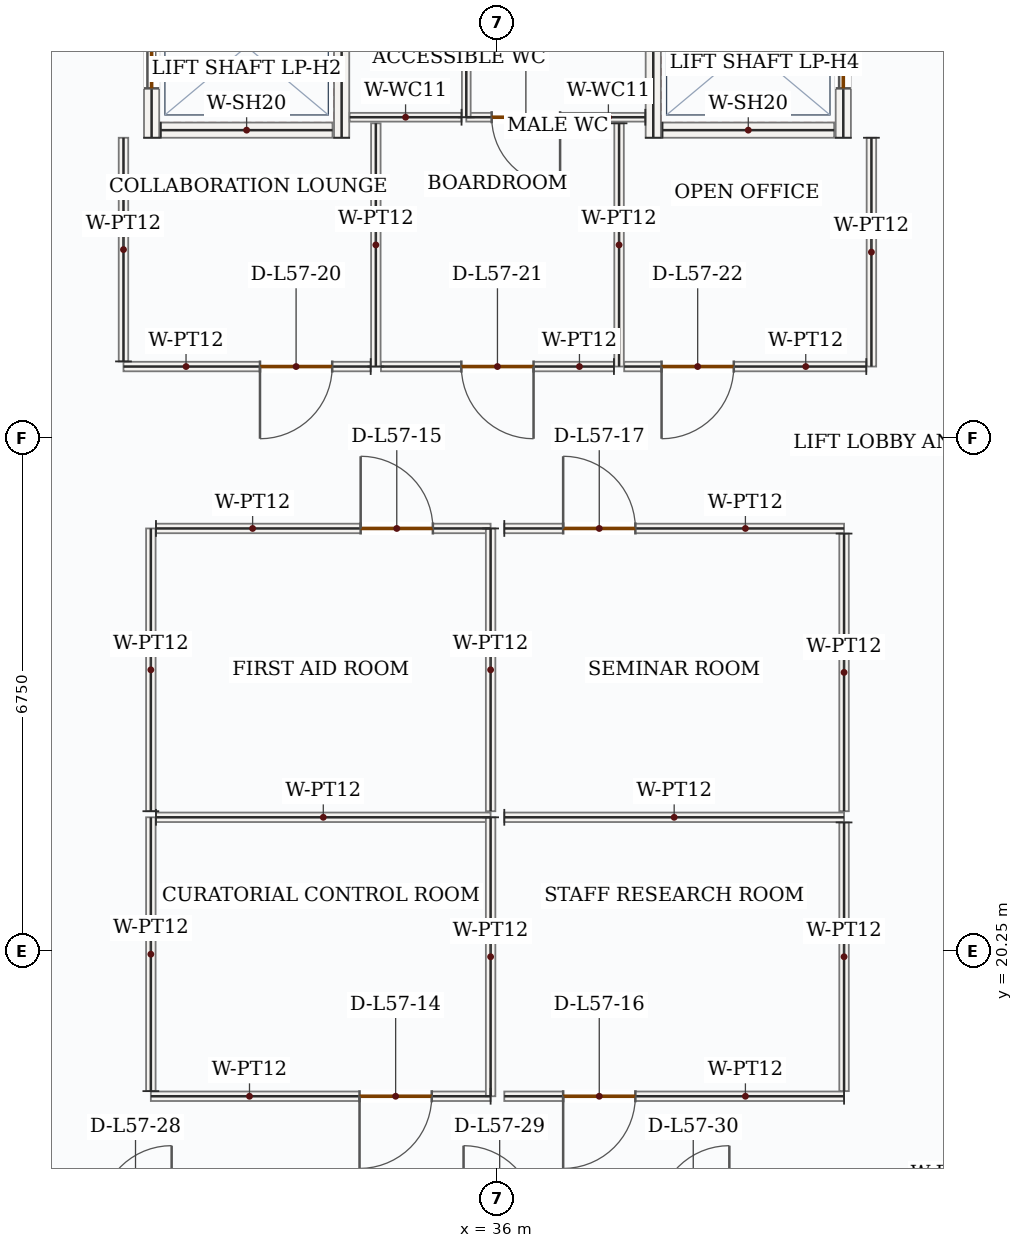
"""IFC4 building model, lengths in metres.
Left out: names, types, materials, properties, quantities, classifications, styles, units other than length and angle.
Written with IfcOpenShell. Run it as: python <this file> out.ifc"""

import sys

from ifc_helpers import new_model, si_unit, direction, frame, frame_2d, origin, place, context, subcontext, project, spatial, rectangle, extrude, source, transform, mapped, element, fill, save


model = new_model("IFC4")
c1 = context("Model", 3, precision=1e-05, world=origin(), true_north=direction((0.0, 1.0)))
c2 = subcontext(c1, "Body", "Model", "MODEL_VIEW")
j1 = project(units=[si_unit("LENGTHUNIT", "METRE"), si_unit("PLANEANGLEUNIT", "RADIAN")], contexts=[c1])
p1 = place(None, origin())
s1 = spatial("IfcSite", under=j1, at=p1, CompositionType="ELEMENT")
p2 = place(p1, origin())
s2 = spatial("IfcBuilding", under=s1, at=p2, CompositionType="ELEMENT")
p3 = place(p2, frame((0.0, 0.0, 242.85)))
s3 = spatial("IfcBuildingStorey", under=s2, at=p3, CompositionType="ELEMENT", Elevation=242.85)
p4 = place(p3, frame((31.45, 30.95, 0.0), z_axis=(0.0, 0.0, 1.0), x_axis=(0.0, 1.0, 0.0)))
e1 = element("IfcWall", 1, at=p4, inside=s3, PredefinedType="SOLIDWALL", context=c2, shape_type="SweptSolid", body=[
    extrude(rectangle(XDim=2.4, YDim=0.2, at=frame_2d((1.2, 0.0))), origin(), (0.0, 0.0, 1.0), 3.5),
])
p5 = place(p4, frame((0.65, 0.0, 0.0)))
e2 = element("IfcOpeningElement", 2, at=p5, cuts=e1, PredefinedType="OPENING", context=c2, shape_type="SweptSolid", body=[
    extrude(rectangle(XDim=1.1, YDim=2.15, at=frame_2d((0.55, 1.075))), frame((0.0, 0.11, 0.0), z_axis=(0.0, -1.0, 0.0), x_axis=(1.0, 0.0, 0.0)), (0.0, 0.0, 1.0), 0.22),
])
m1 = source(origin(), c2, "Body", "SweptSolid", [
    extrude(rectangle(XDim=2.4, YDim=0.2, at=frame_2d((1.2, 0.0))), origin(), (0.0, 0.0, 1.0), 3.5),
])
p6 = place(p3, frame((33.95, 30.95, 0.0), z_axis=(0.0, 0.0, 1.0), x_axis=(0.0, 1.0, 0.0)))
e3 = element("IfcWall", 3, at=p6, inside=s3, PredefinedType="SOLIDWALL", context=c2, shape_type="MappedRepresentation", body=[
    mapped(m1, transform((0.0, 0.0, 0.0), x_axis=(1.0, 0.0, 0.0), y_axis=(0.0, 1.0, 0.0), z_axis=(0.0, 0.0, 1.0), scale=1.0)),
])
m2 = source(origin(), c2, "Body", "SweptSolid", [
    extrude(rectangle(XDim=2.26, YDim=0.2, at=frame_2d((1.13, 0.0))), origin(), (0.0, 0.0, 1.0), 3.5),
])
p7 = place(p3, frame((31.57, 31.05, 0.0), z_axis=(0.0, 0.0, 1.0), x_axis=(1.0, 0.0, 0.0)))
e4 = element("IfcWall", 4, at=p7, inside=s3, PredefinedType="SOLIDWALL", context=c2, shape_type="MappedRepresentation", body=[
    mapped(m2, transform((0.0, 0.0, 0.0), x_axis=(1.0, 0.0, 0.0), y_axis=(0.0, 1.0, 0.0), z_axis=(0.0, 0.0, 1.0), scale=1.0)),
])
p8 = place(p3, frame((38.05, 30.95, 0.0), z_axis=(0.0, 0.0, 1.0), x_axis=(0.0, 1.0, 0.0)))
e5 = element("IfcWall", 5, at=p8, inside=s3, PredefinedType="SOLIDWALL", context=c2, shape_type="MappedRepresentation", body=[
    mapped(m1, transform((0.0, 0.0, 0.0), x_axis=(1.0, 0.0, 0.0), y_axis=(0.0, 1.0, 0.0), z_axis=(0.0, 0.0, 1.0), scale=1.0)),
])
p9 = place(p3, frame((40.55, 30.95, 0.0), z_axis=(0.0, 0.0, 1.0), x_axis=(0.0, 1.0, 0.0)))
e6 = element("IfcWall", 6, at=p9, inside=s3, PredefinedType="SOLIDWALL", context=c2, shape_type="SweptSolid", body=[
    extrude(rectangle(XDim=2.4, YDim=0.2, at=frame_2d((1.2, 0.0))), origin(), (0.0, 0.0, 1.0), 3.5),
])
p10 = place(p9, frame((0.65, 0.0, 0.0)))
e7 = element("IfcOpeningElement", 7, at=p10, cuts=e6, PredefinedType="OPENING", context=c2, shape_type="SweptSolid", body=[
    extrude(rectangle(XDim=1.1, YDim=2.15, at=frame_2d((0.55, 1.075))), frame((0.0, 0.11, 0.0), z_axis=(0.0, -1.0, 0.0), x_axis=(1.0, 0.0, 0.0)), (0.0, 0.0, 1.0), 0.22),
])
p11 = place(p3, frame((38.17, 31.05, 0.0), z_axis=(0.0, 0.0, 1.0), x_axis=(1.0, 0.0, 0.0)))
e8 = element("IfcWall", 8, at=p11, inside=s3, PredefinedType="SOLIDWALL", context=c2, shape_type="MappedRepresentation", body=[
    mapped(m2, transform((0.0, 0.0, 0.0), x_axis=(1.0, 0.0, 0.0), y_axis=(0.0, 1.0, 0.0), z_axis=(0.0, 0.0, 1.0), scale=1.0)),
])
p12 = place(p3, frame((37.945, 31.22, 0.0), z_axis=(0.0, 0.0, 1.0), x_axis=(-1.0, 0.0, 0.0)))
e9 = element("IfcWall", 9, at=p12, inside=s3, PredefinedType="PARTITIONING", context=c2, shape_type="SweptSolid", body=[
    extrude(rectangle(XDim=2.355, YDim=0.115, at=frame_2d((1.177, 0.0))), origin(), (0.0, 0.0, 1.0), 3.5),
])
p13 = place(p12, frame((1.121, 0.0, 0.0)))
e10 = element("IfcOpeningElement", 10, at=p13, cuts=e9, PredefinedType="OPENING", context=c2, shape_type="SweptSolid", body=[
    extrude(rectangle(XDim=0.9, YDim=2.1, at=frame_2d((0.45, 1.05))), frame((0.0, 0.067, 0.0), z_axis=(0.0, -1.0, 0.0), x_axis=(1.0, 0.0, 0.0)), (0.0, 0.0, 1.0), 0.135),
])
m3 = source(origin(), c2, "Body", "SweptSolid", [
    extrude(rectangle(XDim=1.96, YDim=0.115, at=frame_2d((0.98, 0.0))), origin(), (0.0, 0.0, 1.0), 3.5),
])
p14 = place(p3, frame((35.59, 31.22, 0.0), z_axis=(0.0, 0.0, 1.0), x_axis=(0.0, 1.0, 0.0)))
e11 = element("IfcWall", 11, at=p14, inside=s3, PredefinedType="PARTITIONING", context=c2, shape_type="MappedRepresentation", body=[
    mapped(m3, transform((0.0, 0.0, 0.0), x_axis=(1.0, 0.0, 0.0), y_axis=(0.0, 1.0, 0.0), z_axis=(0.0, 0.0, 1.0), scale=1.0)),
])
m4 = source(origin(), c2, "Body", "SweptSolid", [
    extrude(rectangle(XDim=1.473, YDim=0.115, at=frame_2d((0.736, 0.0))), origin(), (0.0, 0.0, 1.0), 3.5),
])
p15 = place(p3, frame((35.528, 31.22, 0.0), z_axis=(0.0, 0.0, 1.0), x_axis=(-1.0, 0.0, 0.0)))
e12 = element("IfcWall", 12, at=p15, inside=s3, PredefinedType="PARTITIONING", context=c2, shape_type="MappedRepresentation", body=[
    mapped(m4, transform((0.0, 0.0, 0.0), x_axis=(1.0, 0.0, 0.0), y_axis=(0.0, 1.0, 0.0), z_axis=(0.0, 0.0, 1.0), scale=1.0)),
])
m5 = source(origin(), c2, "Body", "SweptSolid", [
    extrude(rectangle(XDim=3.2, YDim=0.125, at=frame_2d((1.6, 0.0))), origin(), (0.0, 0.0, 1.0), 3.5),
])
for number, where, z_axis, x_axis in (
    (13, (34.4, 27.94, 0.0), (0.0, 0.0, 1.0), (0.0, 1.0, 0.0)),
    (14, (37.6, 31.14, 0.0), (0.0, 0.0, 1.0), (0.0, -1.0, 0.0)),
):
    element("IfcWall", number, at=place(p3, frame(where, z_axis=z_axis, x_axis=x_axis)), inside=s3, PredefinedType="PARTITIONING", context=c2, shape_type="MappedRepresentation", body=[
        mapped(m5, transform((0.0, 0.0, 0.0), x_axis=(1.0, 0.0, 0.0), y_axis=(0.0, 1.0, 0.0), z_axis=(0.0, 0.0, 1.0), scale=1.0)),
    ])
p16 = place(p3, frame((37.532, 27.94, 0.0), z_axis=(0.0, 0.0, 1.0), x_axis=(-1.0, 0.0, 0.0)))
e15 = element("IfcWall", 15, at=p16, inside=s3, PredefinedType="PARTITIONING", context=c2, shape_type="SweptSolid", body=[
    extrude(rectangle(XDim=3.065, YDim=0.125, at=frame_2d((1.532, 0.0))), origin(), (0.0, 0.0, 1.0), 3.5),
])
p17 = place(p16, frame((1.058, 0.0, 0.0)))
e16 = element("IfcOpeningElement", 16, at=p17, cuts=e15, PredefinedType="OPENING", context=c2, shape_type="SweptSolid", body=[
    extrude(rectangle(XDim=0.95, YDim=2.15, at=frame_2d((0.475, 1.075))), frame((0.0, 0.073, 0.0), z_axis=(0.0, -1.0, 0.0), x_axis=(1.0, 0.0, 0.0)), (0.0, 0.0, 1.0), 0.145),
])
p18 = place(p3, frame((34.333, 27.94, 0.0), z_axis=(0.0, 0.0, 1.0), x_axis=(-1.0, 0.0, 0.0)))
e17 = element("IfcWall", 17, at=p18, inside=s3, PredefinedType="PARTITIONING", context=c2, shape_type="SweptSolid", body=[
    extrude(rectangle(XDim=3.252, YDim=0.125, at=frame_2d((1.626, 0.0))), origin(), (0.0, 0.0, 1.0), 3.5),
])
p19 = place(p18, frame((0.507, 0.0, 0.0)))
e18 = element("IfcOpeningElement", 18, at=p19, cuts=e17, PredefinedType="OPENING", context=c2, shape_type="SweptSolid", body=[
    extrude(rectangle(XDim=0.95, YDim=2.15, at=frame_2d((0.475, 1.075))), frame((0.0, 0.073, 0.0), z_axis=(0.0, -1.0, 0.0), x_axis=(1.0, 0.0, 0.0)), (0.0, 0.0, 1.0), 0.145),
])
m6 = source(origin(), c2, "Body", "SweptSolid", [
    extrude(rectangle(XDim=2.942, YDim=0.125, at=frame_2d((1.471, 0.0))), origin(), (0.0, 0.0, 1.0), 3.5),
])
p20 = place(p3, frame((31.08, 28.008, 0.0), z_axis=(0.0, 0.0, 1.0), x_axis=(0.0, 1.0, 0.0)))
e19 = element("IfcWall", 19, at=p20, inside=s3, PredefinedType="PARTITIONING", context=c2, shape_type="MappedRepresentation", body=[
    mapped(m6, transform((0.0, 0.0, 0.0), x_axis=(1.0, 0.0, 0.0), y_axis=(0.0, 1.0, 0.0), z_axis=(0.0, 0.0, 1.0), scale=1.0)),
])
m7 = source(origin(), c2, "Body", "SweptSolid", [
    extrude(rectangle(XDim=3.01, YDim=0.125, at=frame_2d((1.505, 0.0))), origin(), (0.0, 0.0, 1.0), 3.5),
])
p21 = place(p3, frame((40.92, 30.95, 0.0), z_axis=(0.0, 0.0, 1.0), x_axis=(0.0, -1.0, 0.0)))
e20 = element("IfcWall", 20, at=p21, inside=s3, PredefinedType="PARTITIONING", context=c2, shape_type="MappedRepresentation", body=[
    mapped(m7, transform((0.0, 0.0, 0.0), x_axis=(1.0, 0.0, 0.0), y_axis=(0.0, 1.0, 0.0), z_axis=(0.0, 0.0, 1.0), scale=1.0)),
])
p22 = place(p3, frame((40.853, 27.94, 0.0), z_axis=(0.0, 0.0, 1.0), x_axis=(-1.0, 0.0, 0.0)))
e21 = element("IfcWall", 21, at=p22, inside=s3, PredefinedType="PARTITIONING", context=c2, shape_type="SweptSolid", body=[
    extrude(rectangle(XDim=3.185, YDim=0.125, at=frame_2d((1.593, 0.0))), origin(), (0.0, 0.0, 1.0), 3.5),
])
p23 = place(p22, frame((1.743, 0.0, 0.0)))
e22 = element("IfcOpeningElement", 22, at=p23, cuts=e21, PredefinedType="OPENING", context=c2, shape_type="SweptSolid", body=[
    extrude(rectangle(XDim=0.95, YDim=2.15, at=frame_2d((0.475, 1.075))), frame((0.0, 0.073, 0.0), z_axis=(0.0, -1.0, 0.0), x_axis=(1.0, 0.0, 0.0)), (0.0, 0.0, 1.0), 0.145),
])
p24 = place(p3, frame((35.91, 18.34, 0.0), z_axis=(0.0, 0.0, 1.0), x_axis=(-1.0, 0.0, 0.0)))
e23 = element("IfcWall", 23, at=p24, inside=s3, PredefinedType="PARTITIONING", context=c2, shape_type="SweptSolid", body=[
    extrude(rectangle(XDim=4.47, YDim=0.125, at=frame_2d((2.235, 0.0))), origin(), (0.0, 0.0, 1.0), 3.5),
])
p25 = place(p24, frame((0.774, 0.0, 0.0)))
e24 = element("IfcOpeningElement", 24, at=p25, cuts=e23, PredefinedType="OPENING", context=c2, shape_type="SweptSolid", body=[
    extrude(rectangle(XDim=0.95, YDim=2.15, at=frame_2d((0.475, 1.075))), frame((0.0, 0.073, 0.0), z_axis=(0.0, -1.0, 0.0), x_axis=(1.0, 0.0, 0.0)), (0.0, 0.0, 1.0), 0.145),
])
m8 = source(origin(), c2, "Body", "SweptSolid", [
    extrude(rectangle(XDim=3.603, YDim=0.125, at=frame_2d((1.801, 0.0))), origin(), (0.0, 0.0, 1.0), 3.5),
])
p26 = place(p3, frame((31.44, 18.407, 0.0), z_axis=(0.0, 0.0, 1.0), x_axis=(0.0, 1.0, 0.0)))
e25 = element("IfcWall", 25, at=p26, inside=s3, PredefinedType="PARTITIONING", context=c2, shape_type="MappedRepresentation", body=[
    mapped(m8, transform((0.0, 0.0, 0.0), x_axis=(1.0, 0.0, 0.0), y_axis=(0.0, 1.0, 0.0), z_axis=(0.0, 0.0, 1.0), scale=1.0)),
])
m9 = source(origin(), c2, "Body", "SweptSolid", [
    extrude(rectangle(XDim=4.402, YDim=0.125, at=frame_2d((2.201, 0.0))), origin(), (0.0, 0.0, 1.0), 3.5),
])
p27 = place(p3, frame((31.508, 22.01, 0.0), z_axis=(0.0, 0.0, 1.0), x_axis=(1.0, 0.0, 0.0)))
e26 = element("IfcWall", 26, at=p27, inside=s3, PredefinedType="PARTITIONING", context=c2, shape_type="MappedRepresentation", body=[
    mapped(m9, transform((0.0, 0.0, 0.0), x_axis=(1.0, 0.0, 0.0), y_axis=(0.0, 1.0, 0.0), z_axis=(0.0, 0.0, 1.0), scale=1.0)),
])
m10 = source(origin(), c2, "Body", "SweptSolid", [
    extrude(rectangle(XDim=3.67, YDim=0.125, at=frame_2d((1.835, 0.0))), origin(), (0.0, 0.0, 1.0), 3.5),
])
p28 = place(p3, frame((35.91, 22.01, 0.0), z_axis=(0.0, 0.0, 1.0), x_axis=(0.0, -1.0, 0.0)))
e27 = element("IfcWall", 27, at=p28, inside=s3, PredefinedType="PARTITIONING", context=c2, shape_type="MappedRepresentation", body=[
    mapped(m10, transform((0.0, 0.0, 0.0), x_axis=(1.0, 0.0, 0.0), y_axis=(0.0, 1.0, 0.0), z_axis=(0.0, 0.0, 1.0), scale=1.0)),
])
p29 = place(p3, frame((40.56, 18.34, 0.0), z_axis=(0.0, 0.0, 1.0), x_axis=(-1.0, 0.0, 0.0)))
e28 = element("IfcWall", 28, at=p29, inside=s3, PredefinedType="PARTITIONING", context=c2, shape_type="SweptSolid", body=[
    extrude(rectangle(XDim=4.47, YDim=0.125, at=frame_2d((2.235, 0.0))), origin(), (0.0, 0.0, 1.0), 3.5),
])
p30 = place(p29, frame((2.746, 0.0, 0.0)))
e29 = element("IfcOpeningElement", 29, at=p30, cuts=e28, PredefinedType="OPENING", context=c2, shape_type="SweptSolid", body=[
    extrude(rectangle(XDim=0.95, YDim=2.15, at=frame_2d((0.475, 1.075))), frame((0.0, 0.073, 0.0), z_axis=(0.0, -1.0, 0.0), x_axis=(1.0, 0.0, 0.0)), (0.0, 0.0, 1.0), 0.145),
])
m11 = source(origin(), c2, "Body", "SweptSolid", [
    extrude(rectangle(XDim=4.47, YDim=0.125, at=frame_2d((2.235, 0.0))), origin(), (0.0, 0.0, 1.0), 3.5),
])
p31 = place(p3, frame((36.09, 22.01, 0.0), z_axis=(0.0, 0.0, 1.0), x_axis=(1.0, 0.0, 0.0)))
e30 = element("IfcWall", 30, at=p31, inside=s3, PredefinedType="PARTITIONING", context=c2, shape_type="MappedRepresentation", body=[
    mapped(m11, transform((0.0, 0.0, 0.0), x_axis=(1.0, 0.0, 0.0), y_axis=(0.0, 1.0, 0.0), z_axis=(0.0, 0.0, 1.0), scale=1.0)),
])
m12 = source(origin(), c2, "Body", "SweptSolid", [
    extrude(rectangle(XDim=3.535, YDim=0.125, at=frame_2d((1.768, 0.0))), origin(), (0.0, 0.0, 1.0), 3.5),
])
p32 = place(p3, frame((40.56, 21.942, 0.0), z_axis=(0.0, 0.0, 1.0), x_axis=(0.0, -1.0, 0.0)))
e31 = element("IfcWall", 31, at=p32, inside=s3, PredefinedType="PARTITIONING", context=c2, shape_type="MappedRepresentation", body=[
    mapped(m12, transform((0.0, 0.0, 0.0), x_axis=(1.0, 0.0, 0.0), y_axis=(0.0, 1.0, 0.0), z_axis=(0.0, 0.0, 1.0), scale=1.0)),
])
m13 = source(origin(), c2, "Body", "SweptSolid", [
    extrude(rectangle(XDim=3.72, YDim=0.125, at=frame_2d((1.86, 0.0))), origin(), (0.0, 0.0, 1.0), 3.5),
])
p33 = place(p3, frame((31.44, 22.09, 0.0), z_axis=(0.0, 0.0, 1.0), x_axis=(0.0, 1.0, 0.0)))
e32 = element("IfcWall", 32, at=p33, inside=s3, PredefinedType="PARTITIONING", context=c2, shape_type="MappedRepresentation", body=[
    mapped(m13, transform((0.0, 0.0, 0.0), x_axis=(1.0, 0.0, 0.0), y_axis=(0.0, 1.0, 0.0), z_axis=(0.0, 0.0, 1.0), scale=1.0)),
])
p34 = place(p3, frame((31.508, 25.81, 0.0), z_axis=(0.0, 0.0, 1.0), x_axis=(1.0, 0.0, 0.0)))
e33 = element("IfcWall", 33, at=p34, inside=s3, PredefinedType="PARTITIONING", context=c2, shape_type="SweptSolid", body=[
    extrude(rectangle(XDim=4.402, YDim=0.125, at=frame_2d((2.201, 0.0))), origin(), (0.0, 0.0, 1.0), 3.5),
])
p35 = place(p34, frame((2.693, 0.0, 0.0)))
e34 = element("IfcOpeningElement", 34, at=p35, cuts=e33, PredefinedType="OPENING", context=c2, shape_type="SweptSolid", body=[
    extrude(rectangle(XDim=0.95, YDim=2.15, at=frame_2d((0.475, 1.075))), frame((0.0, 0.073, 0.0), z_axis=(0.0, -1.0, 0.0), x_axis=(1.0, 0.0, 0.0)), (0.0, 0.0, 1.0), 0.145),
])
p36 = place(p3, frame((35.91, 25.81, 0.0), z_axis=(0.0, 0.0, 1.0), x_axis=(0.0, -1.0, 0.0)))
e35 = element("IfcWall", 35, at=p36, inside=s3, PredefinedType="PARTITIONING", context=c2, shape_type="MappedRepresentation", body=[
    mapped(m13, transform((0.0, 0.0, 0.0), x_axis=(1.0, 0.0, 0.0), y_axis=(0.0, 1.0, 0.0), z_axis=(0.0, 0.0, 1.0), scale=1.0)),
])
p37 = place(p3, frame((36.09, 25.81, 0.0), z_axis=(0.0, 0.0, 1.0), x_axis=(1.0, 0.0, 0.0)))
e36 = element("IfcWall", 36, at=p37, inside=s3, PredefinedType="PARTITIONING", context=c2, shape_type="SweptSolid", body=[
    extrude(rectangle(XDim=4.47, YDim=0.125, at=frame_2d((2.235, 0.0))), origin(), (0.0, 0.0, 1.0), 3.5),
])
p38 = place(p37, frame((0.774, 0.0, 0.0)))
e37 = element("IfcOpeningElement", 37, at=p38, cuts=e36, PredefinedType="OPENING", context=c2, shape_type="SweptSolid", body=[
    extrude(rectangle(XDim=0.95, YDim=2.15, at=frame_2d((0.475, 1.075))), frame((0.0, 0.073, 0.0), z_axis=(0.0, -1.0, 0.0), x_axis=(1.0, 0.0, 0.0)), (0.0, 0.0, 1.0), 0.145),
])
m14 = source(origin(), c2, "Body", "SweptSolid", [
    extrude(rectangle(XDim=3.652, YDim=0.125, at=frame_2d((1.826, 0.0))), origin(), (0.0, 0.0, 1.0), 3.5),
])
p39 = place(p3, frame((40.56, 25.742, 0.0), z_axis=(0.0, 0.0, 1.0), x_axis=(0.0, -1.0, 0.0)))
e38 = element("IfcWall", 38, at=p39, inside=s3, PredefinedType="PARTITIONING", context=c2, shape_type="MappedRepresentation", body=[
    mapped(m14, transform((0.0, 0.0, 0.0), x_axis=(1.0, 0.0, 0.0), y_axis=(0.0, 1.0, 0.0), z_axis=(0.0, 0.0, 1.0), scale=1.0)),
])
m15 = source(origin(), c2, "Body", "SweptSolid", [
    extrude(rectangle(XDim=1.1, YDim=2.15, at=frame_2d((0.55, 1.075))), frame((0.0, 0.025, 0.0), z_axis=(0.0, -1.0, 0.0), x_axis=(1.0, 0.0, 0.0)), (0.0, 0.0, 1.0), 0.05),
])
p40 = place(p5, origin())
e39 = element("IfcDoor", 39, at=p40, inside=s3, OperationType="DOUBLE_DOOR_SLIDING", PredefinedType="DOOR", context=c2, shape_type="MappedRepresentation", body=[
    mapped(m15, transform((0.0, 0.0, 0.0), x_axis=(1.0, 0.0, 0.0), y_axis=(0.0, 1.0, 0.0), z_axis=(0.0, 0.0, 1.0), scale=1.0)),
])
fill(e2, e39)
p41 = place(p10, origin())
e40 = element("IfcDoor", 40, at=p41, inside=s3, OperationType="DOUBLE_DOOR_SLIDING", PredefinedType="DOOR", context=c2, shape_type="MappedRepresentation", body=[
    mapped(m15, transform((0.0, 0.0, 0.0), x_axis=(1.0, 0.0, 0.0), y_axis=(0.0, 1.0, 0.0), z_axis=(0.0, 0.0, 1.0), scale=1.0)),
])
fill(e7, e40)
m16 = source(origin(), c2, "Body", "SweptSolid", [
    extrude(rectangle(XDim=0.95, YDim=2.15, at=frame_2d((0.475, 1.075))), frame((0.0, 0.025, 0.0), z_axis=(0.0, -1.0, 0.0), x_axis=(1.0, 0.0, 0.0)), (0.0, 0.0, 1.0), 0.05),
])
p42 = place(p25, origin())
e41 = element("IfcDoor", 41, at=p42, inside=s3, OperationType="SINGLE_SWING_RIGHT", PredefinedType="DOOR", context=c2, shape_type="MappedRepresentation", body=[
    mapped(m16, transform((0.0, 0.0, 0.0), x_axis=(1.0, 0.0, 0.0), y_axis=(0.0, 1.0, 0.0), z_axis=(0.0, 0.0, 1.0), scale=1.0)),
])
fill(e24, e41)
p43 = place(p35, origin())
e42 = element("IfcDoor", 42, at=p43, inside=s3, OperationType="SINGLE_SWING_LEFT", PredefinedType="DOOR", context=c2, shape_type="MappedRepresentation", body=[
    mapped(m16, transform((0.0, 0.0, 0.0), x_axis=(1.0, 0.0, 0.0), y_axis=(0.0, 1.0, 0.0), z_axis=(0.0, 0.0, 1.0), scale=1.0)),
])
fill(e34, e42)
p44 = place(p30, origin())
e43 = element("IfcDoor", 43, at=p44, inside=s3, OperationType="SINGLE_SWING_RIGHT", PredefinedType="DOOR", context=c2, shape_type="MappedRepresentation", body=[
    mapped(m16, transform((0.0, 0.0, 0.0), x_axis=(1.0, 0.0, 0.0), y_axis=(0.0, 1.0, 0.0), z_axis=(0.0, 0.0, 1.0), scale=1.0)),
])
fill(e29, e43)
p45 = place(p38, origin())
e44 = element("IfcDoor", 44, at=p45, inside=s3, OperationType="SINGLE_SWING_LEFT", PredefinedType="DOOR", context=c2, shape_type="MappedRepresentation", body=[
    mapped(m16, transform((0.0, 0.0, 0.0), x_axis=(1.0, 0.0, 0.0), y_axis=(0.0, 1.0, 0.0), z_axis=(0.0, 0.0, 1.0), scale=1.0)),
])
fill(e37, e44)
p46 = place(p19, origin())
e45 = element("IfcDoor", 45, at=p46, inside=s3, OperationType="SINGLE_SWING_RIGHT", PredefinedType="DOOR", context=c2, shape_type="MappedRepresentation", body=[
    mapped(m16, transform((0.0, 0.0, 0.0), x_axis=(1.0, 0.0, 0.0), y_axis=(0.0, 1.0, 0.0), z_axis=(0.0, 0.0, 1.0), scale=1.0)),
])
fill(e18, e45)
p47 = place(p17, origin())
e46 = element("IfcDoor", 46, at=p47, inside=s3, OperationType="SINGLE_SWING_LEFT", PredefinedType="DOOR", context=c2, shape_type="MappedRepresentation", body=[
    mapped(m16, transform((0.0, 0.0, 0.0), x_axis=(1.0, 0.0, 0.0), y_axis=(0.0, 1.0, 0.0), z_axis=(0.0, 0.0, 1.0), scale=1.0)),
])
fill(e16, e46)
p48 = place(p23, origin())
e47 = element("IfcDoor", 47, at=p48, inside=s3, OperationType="SINGLE_SWING_RIGHT", PredefinedType="DOOR", context=c2, shape_type="MappedRepresentation", body=[
    mapped(m16, transform((0.0, 0.0, 0.0), x_axis=(1.0, 0.0, 0.0), y_axis=(0.0, 1.0, 0.0), z_axis=(0.0, 0.0, 1.0), scale=1.0)),
])
fill(e22, e47)
m17 = source(origin(), c2, "Body", "SweptSolid", [
    extrude(rectangle(XDim=0.9, YDim=2.1, at=frame_2d((0.45, 1.05))), frame((0.0, 0.025, 0.0), z_axis=(0.0, -1.0, 0.0), x_axis=(1.0, 0.0, 0.0)), (0.0, 0.0, 1.0), 0.05),
])
p49 = place(p13, origin())
e48 = element("IfcDoor", 48, at=p49, inside=s3, OperationType="SINGLE_SWING_LEFT", PredefinedType="DOOR", context=c2, shape_type="MappedRepresentation", body=[
    mapped(m17, transform((0.0, 0.0, 0.0), x_axis=(1.0, 0.0, 0.0), y_axis=(0.0, 1.0, 0.0), z_axis=(0.0, 0.0, 1.0), scale=1.0)),
])
fill(e10, e48)
save(model, sys.argv[1])
